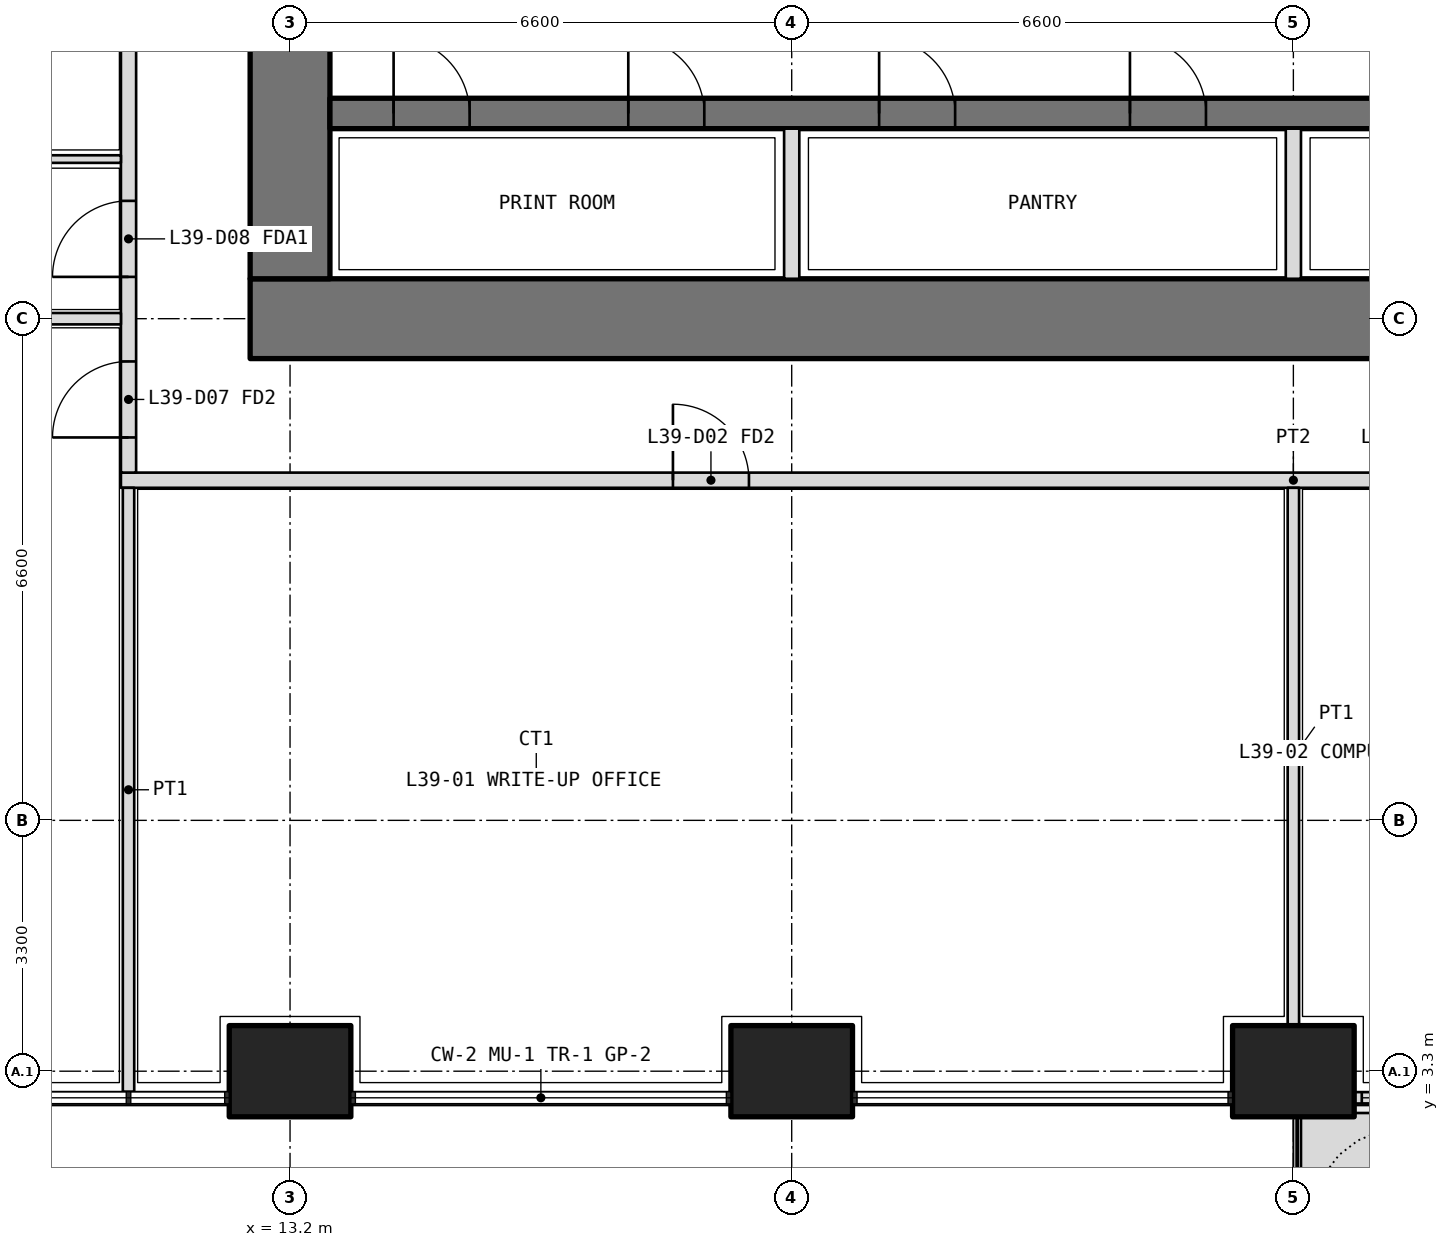
"""IFC4 building model, lengths in metres.
Left out: names, types, materials, properties, quantities, classifications, styles, units other than length and angle.
Written with IfcOpenShell. Run it as: python <this file> out.ifc"""

import sys

from ifc_helpers import new_model, si_unit, direction, frame, frame_2d, origin, origin_2d, place, context, subcontext, project, spatial, polyline, rectangle, outline, extrude, element, fill, save


model = new_model("IFC4")
c1 = context("Model", 3, precision=1e-05, world=origin(), true_north=direction((0.0, 1.0)))
c2 = subcontext(c1, "Body", "Model", "MODEL_VIEW")
j1 = project(units=[si_unit("LENGTHUNIT", "METRE"), si_unit("PLANEANGLEUNIT", "RADIAN")], contexts=[c1])
p1 = place(None, origin())
s1 = spatial("IfcSite", under=j1, at=p1, CompositionType="ELEMENT")
p2 = place(p1, origin())
s2 = spatial("IfcBuilding", under=s1, at=p2, CompositionType="ELEMENT")
p3 = place(p2, frame((0.0, 0.0, 172.5)))
s3 = spatial("IfcBuildingStorey", under=s2, at=p3, CompositionType="ELEMENT", Elevation=172.5)
for number, where, z_axis, x_axis in (
    (1, (13.2, 3.3, 0.0), (0.0, 0.0, 1.0), (1.0, 0.0, 0.0)),
    (2, (19.8, 3.3, 0.0), (0.0, 0.0, 1.0), (1.0, 0.0, 0.0)),
    (3, (26.4, 3.3, 0.0), (0.0, 0.0, 1.0), (1.0, 0.0, 0.0)),
):
    element("IfcColumn", number, at=place(p3, frame(where, z_axis=z_axis, x_axis=x_axis)), inside=s3, PredefinedType="COLUMN", context=c2, shape_type="SweptSolid", body=[
        extrude(rectangle(XDim=1.6, YDim=1.2, at=origin_2d()), origin(), (0.0, 0.0, 1.0), 4.2),
    ])
p4 = place(p3, origin())
e4 = element("IfcWall", 4, at=p4, inside=s3, PredefinedType="USERDEFINED", context=c2, shape_type="SweptSolid", body=[
    extrude(outline(polyline([(26.5, 1.75), (28.95, 1.75), (28.95, 2.75), (26.5, 2.75), (26.5, 1.75)]), holes=[polyline([(26.65, 1.9), (28.8, 1.9), (28.8, 2.6), (26.65, 2.6), (26.65, 1.9)])]), origin(), (0.0, 0.0, 1.0), 1.05),
])
p5 = place(p3, frame((27.2, 2.95, 0.0), z_axis=(0.0, 0.0, 1.0), x_axis=(1.0, 0.0, 0.0)))
e5 = element("IfcWall", 5, at=p5, inside=s3, PredefinedType="SOLIDWALL", context=c2, shape_type="SweptSolid", body=[
    extrude(rectangle(XDim=5.0, YDim=0.15, at=frame_2d((2.5, 0.0))), origin(), (0.0, 0.0, 1.0), 2.7),
])
p6 = place(p5, frame((2.75, 0.0, 0.0)))
e6 = element("IfcOpeningElement", 6, at=p6, cuts=e5, PredefinedType="OPENING", context=c2, shape_type="SweptSolid", body=[
    extrude(rectangle(XDim=1.0, YDim=2.4, at=frame_2d((0.5, 1.2))), frame((0.0, 0.085, 0.0), z_axis=(0.0, -1.0, 0.0), x_axis=(1.0, 0.0, 0.0)), (0.0, 0.0, 1.0), 0.17),
])
p7 = place(p5, frame((0.1, 0.0, 0.1)))
e7 = element("IfcOpeningElement", 7, at=p7, cuts=e5, PredefinedType="OPENING", context=c2, shape_type="SweptSolid", body=[
    extrude(rectangle(XDim=2.15, YDim=2.3, at=frame_2d((1.075, 1.15))), frame((0.0, 0.085, 0.0), z_axis=(0.0, -1.0, 0.0), x_axis=(1.0, 0.0, 0.0)), (0.0, 0.0, 1.0), 0.17),
])
p8 = place(p5, frame((3.85, 0.0, 0.1)))
e8 = element("IfcOpeningElement", 8, at=p8, cuts=e5, PredefinedType="OPENING", context=c2, shape_type="SweptSolid", body=[
    extrude(rectangle(XDim=1.05, YDim=2.3, at=frame_2d((0.525, 1.15))), frame((0.0, 0.085, 0.0), z_axis=(0.0, -1.0, 0.0), x_axis=(1.0, 0.0, 0.0)), (0.0, 0.0, 1.0), 0.17),
])
p9 = place(p3, frame((12.675, 13.2, 0.0), z_axis=(0.0, 0.0, 1.0), x_axis=(1.0, 0.0, 0.0)))
e9 = element("IfcWall", 9, at=p9, inside=s3, PredefinedType="SHEAR", context=c2, shape_type="SweptSolid", body=[
    extrude(rectangle(XDim=27.45, YDim=1.05, at=frame_2d((13.725, 0.0))), origin(), (0.0, 0.0, 1.0), 4.2),
])
p10 = place(p3, frame((13.2, 32.475, 0.0), z_axis=(0.0, 0.0, 1.0), x_axis=(0.0, -1.0, 0.0)))
e10 = element("IfcWall", 10, at=p10, inside=s3, PredefinedType="SHEAR", context=c2, shape_type="SweptSolid", body=[
    extrude(rectangle(XDim=18.75, YDim=1.05, at=frame_2d((9.375, 0.0))), origin(), (0.0, 0.0, 1.0), 4.2),
])
p11 = place(p10, frame((14.125, 0.0, 0.0)))
e11 = element("IfcOpeningElement", 11, at=p11, cuts=e10, PredefinedType="OPENING", context=c2, shape_type="SweptSolid", body=[
    extrude(rectangle(XDim=1.6, YDim=2.1, at=frame_2d((0.8, 1.05))), frame((0.0, 0.535, 0.0), z_axis=(0.0, -1.0, 0.0), x_axis=(1.0, 0.0, 0.0)), (0.0, 0.0, 1.0), 1.07),
])
p12 = place(p10, frame((3.325, 0.0, 0.0)))
e12 = element("IfcOpeningElement", 12, at=p12, cuts=e10, PredefinedType="OPENING", context=c2, shape_type="SweptSolid", body=[
    extrude(rectangle(XDim=1.6, YDim=2.1, at=frame_2d((0.8, 1.05))), frame((0.0, 0.535, 0.0), z_axis=(0.0, -1.0, 0.0), x_axis=(1.0, 0.0, 0.0)), (0.0, 0.0, 1.0), 1.07),
])
p13 = place(p3, frame((13.725, 15.9, 0.0), z_axis=(0.0, 0.0, 1.0), x_axis=(1.0, 0.0, 0.0)))
e13 = element("IfcWall", 13, at=p13, inside=s3, PredefinedType="SHEAR", context=c2, shape_type="SweptSolid", body=[
    extrude(rectangle(XDim=25.35, YDim=0.4, at=frame_2d((12.675, 0.0))), origin(), (0.0, 0.0, 1.0), 4.2),
])
p14 = place(p13, frame((0.837, 0.0, 0.0)))
e14 = element("IfcOpeningElement", 14, at=p14, cuts=e13, PredefinedType="OPENING", context=c2, shape_type="SweptSolid", body=[
    extrude(rectangle(XDim=1.0, YDim=2.1, at=frame_2d((0.5, 1.05))), frame((0.0, 0.21, 0.0), z_axis=(0.0, -1.0, 0.0), x_axis=(1.0, 0.0, 0.0)), (0.0, 0.0, 1.0), 0.42),
])
p15 = place(p13, frame((3.925, 0.0, 0.0)))
e15 = element("IfcOpeningElement", 15, at=p15, cuts=e13, PredefinedType="OPENING", context=c2, shape_type="SweptSolid", body=[
    extrude(rectangle(XDim=1.0, YDim=2.1, at=frame_2d((0.5, 1.05))), frame((0.0, 0.21, 0.0), z_axis=(0.0, -1.0, 0.0), x_axis=(1.0, 0.0, 0.0)), (0.0, 0.0, 1.0), 0.42),
])
p16 = place(p13, frame((7.225, 0.0, 0.0)))
e16 = element("IfcOpeningElement", 16, at=p16, cuts=e13, PredefinedType="OPENING", context=c2, shape_type="SweptSolid", body=[
    extrude(rectangle(XDim=1.0, YDim=2.1, at=frame_2d((0.5, 1.05))), frame((0.0, 0.21, 0.0), z_axis=(0.0, -1.0, 0.0), x_axis=(1.0, 0.0, 0.0)), (0.0, 0.0, 1.0), 0.42),
])
p17 = place(p13, frame((10.525, 0.0, 0.0)))
e17 = element("IfcOpeningElement", 17, at=p17, cuts=e13, PredefinedType="OPENING", context=c2, shape_type="SweptSolid", body=[
    extrude(rectangle(XDim=1.0, YDim=2.1, at=frame_2d((0.5, 1.05))), frame((0.0, 0.21, 0.0), z_axis=(0.0, -1.0, 0.0), x_axis=(1.0, 0.0, 0.0)), (0.0, 0.0, 1.0), 0.42),
])
p18 = place(p13, frame((13.825, 0.0, 0.0)))
e18 = element("IfcOpeningElement", 18, at=p18, cuts=e13, PredefinedType="OPENING", context=c2, shape_type="SweptSolid", body=[
    extrude(rectangle(XDim=1.0, YDim=2.1, at=frame_2d((0.5, 1.05))), frame((0.0, 0.21, 0.0), z_axis=(0.0, -1.0, 0.0), x_axis=(1.0, 0.0, 0.0)), (0.0, 0.0, 1.0), 0.42),
])
p19 = place(p13, frame((17.125, 0.0, 0.0)))
e19 = element("IfcOpeningElement", 19, at=p19, cuts=e13, PredefinedType="OPENING", context=c2, shape_type="SweptSolid", body=[
    extrude(rectangle(XDim=1.0, YDim=2.1, at=frame_2d((0.5, 1.05))), frame((0.0, 0.21, 0.0), z_axis=(0.0, -1.0, 0.0), x_axis=(1.0, 0.0, 0.0)), (0.0, 0.0, 1.0), 0.42),
])
p20 = place(p13, frame((20.425, 0.0, 0.0)))
e20 = element("IfcOpeningElement", 20, at=p20, cuts=e13, PredefinedType="OPENING", context=c2, shape_type="SweptSolid", body=[
    extrude(rectangle(XDim=1.0, YDim=2.1, at=frame_2d((0.5, 1.05))), frame((0.0, 0.21, 0.0), z_axis=(0.0, -1.0, 0.0), x_axis=(1.0, 0.0, 0.0)), (0.0, 0.0, 1.0), 0.42),
])
p21 = place(p13, frame((23.512, 0.0, 0.0)))
e21 = element("IfcOpeningElement", 21, at=p21, cuts=e13, PredefinedType="OPENING", context=c2, shape_type="SweptSolid", body=[
    extrude(rectangle(XDim=1.0, YDim=2.1, at=frame_2d((0.5, 1.05))), frame((0.0, 0.21, 0.0), z_axis=(0.0, -1.0, 0.0), x_axis=(1.0, 0.0, 0.0)), (0.0, 0.0, 1.0), 0.42),
])
for number, where, z_axis, x_axis in (
    (22, (19.8, 13.725, 0.0), (0.0, 0.0, 1.0), (0.0, 1.0, 0.0)),
    (23, (26.4, 13.725, 0.0), (0.0, 0.0, 1.0), (0.0, 1.0, 0.0)),
):
    element("IfcWall", number, at=place(p3, frame(where, z_axis=z_axis, x_axis=x_axis)), inside=s3, PredefinedType="PARTITIONING", context=c2, shape_type="SweptSolid", body=[
        extrude(rectangle(XDim=1.975, YDim=0.2, at=frame_2d((0.987, 0.0))), origin(), (0.0, 0.0, 1.0), 4.2),
    ])
p22 = place(p3, frame((10.975, 11.075, 0.0), z_axis=(0.0, 0.0, 1.0), x_axis=(1.0, 0.0, 0.0)))
e24 = element("IfcWall", 24, at=p22, inside=s3, PredefinedType="PARTITIONING", context=c2, shape_type="SweptSolid", body=[
    extrude(rectangle(XDim=30.85, YDim=0.2, at=frame_2d((15.425, 0.0))), origin(), (0.0, 0.0, 1.0), 2.85),
])
p23 = place(p22, frame((7.262, 0.0, 0.0)))
e25 = element("IfcOpeningElement", 25, at=p23, cuts=e24, PredefinedType="OPENING", context=c2, shape_type="SweptSolid", body=[
    extrude(rectangle(XDim=1.0, YDim=2.1, at=frame_2d((0.5, 1.05))), frame((0.0, 0.11, 0.0), z_axis=(0.0, -1.0, 0.0), x_axis=(1.0, 0.0, 0.0)), (0.0, 0.0, 1.0), 0.22),
])
p24 = place(p22, frame((16.475, 0.0, 0.0)))
e26 = element("IfcOpeningElement", 26, at=p24, cuts=e24, PredefinedType="OPENING", context=c2, shape_type="SweptSolid", body=[
    extrude(rectangle(XDim=1.2, YDim=2.1, at=frame_2d((0.6, 1.05))), frame((0.0, 0.11, 0.0), z_axis=(0.0, -1.0, 0.0), x_axis=(1.0, 0.0, 0.0)), (0.0, 0.0, 1.0), 0.22),
])
p25 = place(p22, frame((21.525, 0.0, 0.0)))
e27 = element("IfcOpeningElement", 27, at=p25, cuts=e24, PredefinedType="OPENING", context=c2, shape_type="SweptSolid", body=[
    extrude(rectangle(XDim=1.0, YDim=2.1, at=frame_2d((0.5, 1.05))), frame((0.0, 0.11, 0.0), z_axis=(0.0, -1.0, 0.0), x_axis=(1.0, 0.0, 0.0)), (0.0, 0.0, 1.0), 0.22),
])
p26 = place(p22, frame((26.375, 0.0, 0.0)))
e28 = element("IfcOpeningElement", 28, at=p26, cuts=e24, PredefinedType="OPENING", context=c2, shape_type="SweptSolid", body=[
    extrude(rectangle(XDim=1.2, YDim=2.1, at=frame_2d((0.6, 1.05))), frame((0.0, 0.11, 0.0), z_axis=(0.0, -1.0, 0.0), x_axis=(1.0, 0.0, 0.0)), (0.0, 0.0, 1.0), 0.22),
])
p27 = place(p22, frame((29.188, 0.0, 0.0)))
e29 = element("IfcOpeningElement", 29, at=p27, cuts=e24, PredefinedType="OPENING", context=c2, shape_type="SweptSolid", body=[
    extrude(rectangle(XDim=1.0, YDim=2.1, at=frame_2d((0.5, 1.05))), frame((0.0, 0.11, 0.0), z_axis=(0.0, -1.0, 0.0), x_axis=(1.0, 0.0, 0.0)), (0.0, 0.0, 1.0), 0.22),
])
p28 = place(p3, frame((11.075, 11.175, 0.0), z_axis=(0.0, 0.0, 1.0), x_axis=(0.0, 1.0, 0.0)))
e30 = element("IfcWall", 30, at=p28, inside=s3, PredefinedType="PARTITIONING", context=c2, shape_type="SweptSolid", body=[
    extrude(rectangle(XDim=15.225, YDim=0.2, at=frame_2d((7.612, 0.0))), origin(), (0.0, 0.0, 1.0), 2.85),
])
p29 = place(p28, frame((0.462, 0.0, 0.0)))
e31 = element("IfcOpeningElement", 31, at=p29, cuts=e30, PredefinedType="OPENING", context=c2, shape_type="SweptSolid", body=[
    extrude(rectangle(XDim=1.0, YDim=2.1, at=frame_2d((0.5, 1.05))), frame((0.0, 0.11, 0.0), z_axis=(0.0, -1.0, 0.0), x_axis=(1.0, 0.0, 0.0)), (0.0, 0.0, 1.0), 0.22),
])
p30 = place(p28, frame((2.575, 0.0, 0.0)))
e32 = element("IfcOpeningElement", 32, at=p30, cuts=e30, PredefinedType="OPENING", context=c2, shape_type="SweptSolid", body=[
    extrude(rectangle(XDim=1.0, YDim=2.1, at=frame_2d((0.5, 1.05))), frame((0.0, 0.11, 0.0), z_axis=(0.0, -1.0, 0.0), x_axis=(1.0, 0.0, 0.0)), (0.0, 0.0, 1.0), 0.22),
])
p31 = place(p28, frame((5.625, 0.0, 0.0)))
e33 = element("IfcOpeningElement", 33, at=p31, cuts=e30, PredefinedType="OPENING", context=c2, shape_type="SweptSolid", body=[
    extrude(rectangle(XDim=0.9, YDim=2.1, at=frame_2d((0.45, 1.05))), frame((0.0, 0.11, 0.0), z_axis=(0.0, -1.0, 0.0), x_axis=(1.0, 0.0, 0.0)), (0.0, 0.0, 1.0), 0.22),
])
p32 = place(p28, frame((9.425, 0.0, 0.0)))
e34 = element("IfcOpeningElement", 34, at=p32, cuts=e30, PredefinedType="OPENING", context=c2, shape_type="SweptSolid", body=[
    extrude(rectangle(XDim=0.9, YDim=2.1, at=frame_2d((0.45, 1.05))), frame((0.0, 0.11, 0.0), z_axis=(0.0, -1.0, 0.0), x_axis=(1.0, 0.0, 0.0)), (0.0, 0.0, 1.0), 0.22),
])
p33 = place(p28, frame((12.975, 0.0, 0.0)))
e35 = element("IfcOpeningElement", 35, at=p33, cuts=e30, PredefinedType="OPENING", context=c2, shape_type="SweptSolid", body=[
    extrude(rectangle(XDim=1.0, YDim=2.1, at=frame_2d((0.5, 1.05))), frame((0.0, 0.11, 0.0), z_axis=(0.0, -1.0, 0.0), x_axis=(1.0, 0.0, 0.0)), (0.0, 0.0, 1.0), 0.22),
])
p34 = place(p3, frame((11.075, 3.03, 0.0), z_axis=(0.0, 0.0, 1.0), x_axis=(0.0, 1.0, 0.0)))
e36 = element("IfcWall", 36, at=p34, inside=s3, PredefinedType="PARTITIONING", context=c2, shape_type="SweptSolid", body=[
    extrude(rectangle(XDim=7.945, YDim=0.15, at=frame_2d((3.973, 0.0))), origin(), (0.0, 0.0, 1.0), 2.7),
])
p35 = place(p3, frame((26.4, 3.9, 0.0), z_axis=(0.0, 0.0, 1.0), x_axis=(0.0, 1.0, 0.0)))
e37 = element("IfcWall", 37, at=p35, inside=s3, PredefinedType="PARTITIONING", context=c2, shape_type="SweptSolid", body=[
    extrude(rectangle(XDim=7.075, YDim=0.15, at=frame_2d((3.538, 0.0))), origin(), (0.0, 0.0, 1.0), 2.85),
])
p36 = place(p3, frame((3.03, 15.3, 0.0), z_axis=(0.0, 0.0, 1.0), x_axis=(1.0, 0.0, 0.0)))
e38 = element("IfcWall", 38, at=p36, inside=s3, PredefinedType="PARTITIONING", context=c2, shape_type="SweptSolid", body=[
    extrude(rectangle(XDim=7.945, YDim=0.1, at=frame_2d((3.973, 0.0))), origin(), (0.0, 0.0, 1.0), 2.7),
])
p37 = place(p3, frame((7.2, 13.2, 0.0), z_axis=(0.0, 0.0, 1.0), x_axis=(1.0, 0.0, 0.0)))
e39 = element("IfcWall", 39, at=p37, inside=s3, PredefinedType="PARTITIONING", context=c2, shape_type="SweptSolid", body=[
    extrude(rectangle(XDim=3.775, YDim=0.15, at=frame_2d((1.888, 0.0))), origin(), (0.0, 0.0, 1.0), 2.85),
])
p38 = place(p7, origin())
e40 = element("IfcWindow", 40, at=p38, inside=s3, PartitioningType="SINGLE_PANEL", PredefinedType="WINDOW", context=c2, shape_type="SweptSolid", body=[
    extrude(rectangle(XDim=2.15, YDim=2.3, at=frame_2d((1.075, 1.15))), frame((0.0, 0.03, 0.0), z_axis=(0.0, -1.0, 0.0), x_axis=(1.0, 0.0, 0.0)), (0.0, 0.0, 1.0), 0.06),
])
fill(e7, e40)
p39 = place(p23, origin())
e41 = element("IfcDoor", 41, at=p39, inside=s3, OperationType="SINGLE_SWING_LEFT", PredefinedType="DOOR", context=c2, shape_type="SweptSolid", body=[
    extrude(rectangle(XDim=1.0, YDim=2.1, at=frame_2d((0.5, 1.05))), frame((0.0, 0.025, 0.0), z_axis=(0.0, -1.0, 0.0), x_axis=(1.0, 0.0, 0.0)), (0.0, 0.0, 1.0), 0.05),
])
fill(e25, e41)
p40 = place(p29, origin())
e42 = element("IfcDoor", 42, at=p40, inside=s3, OperationType="SINGLE_SWING_LEFT", PredefinedType="DOOR", context=c2, shape_type="SweptSolid", body=[
    extrude(rectangle(XDim=1.0, YDim=2.1, at=frame_2d((0.5, 1.05))), frame((0.0, 0.025, 0.0), z_axis=(0.0, -1.0, 0.0), x_axis=(1.0, 0.0, 0.0)), (0.0, 0.0, 1.0), 0.05),
])
fill(e31, e42)
p41 = place(p30, origin())
e43 = element("IfcDoor", 43, at=p41, inside=s3, OperationType="SINGLE_SWING_LEFT", PredefinedType="DOOR", context=c2, shape_type="SweptSolid", body=[
    extrude(rectangle(XDim=1.0, YDim=2.1, at=frame_2d((0.5, 1.05))), frame((0.0, 0.025, 0.0), z_axis=(0.0, -1.0, 0.0), x_axis=(1.0, 0.0, 0.0)), (0.0, 0.0, 1.0), 0.05),
])
fill(e32, e43)
p42 = place(p14, origin())
e44 = element("IfcDoor", 44, at=p42, inside=s3, OperationType="SINGLE_SWING_LEFT", PredefinedType="DOOR", context=c2, shape_type="SweptSolid", body=[
    extrude(rectangle(XDim=1.0, YDim=2.1, at=frame_2d((0.5, 1.05))), frame((0.0, 0.025, 0.0), z_axis=(0.0, -1.0, 0.0), x_axis=(1.0, 0.0, 0.0)), (0.0, 0.0, 1.0), 0.05),
])
fill(e14, e44)
p43 = place(p15, origin())
e45 = element("IfcDoor", 45, at=p43, inside=s3, OperationType="SINGLE_SWING_LEFT", PredefinedType="DOOR", context=c2, shape_type="SweptSolid", body=[
    extrude(rectangle(XDim=1.0, YDim=2.1, at=frame_2d((0.5, 1.05))), frame((0.0, 0.025, 0.0), z_axis=(0.0, -1.0, 0.0), x_axis=(1.0, 0.0, 0.0)), (0.0, 0.0, 1.0), 0.05),
])
fill(e15, e45)
p44 = place(p16, origin())
e46 = element("IfcDoor", 46, at=p44, inside=s3, OperationType="SINGLE_SWING_LEFT", PredefinedType="DOOR", context=c2, shape_type="SweptSolid", body=[
    extrude(rectangle(XDim=1.0, YDim=2.1, at=frame_2d((0.5, 1.05))), frame((0.0, 0.025, 0.0), z_axis=(0.0, -1.0, 0.0), x_axis=(1.0, 0.0, 0.0)), (0.0, 0.0, 1.0), 0.05),
])
fill(e16, e46)
p45 = place(p17, origin())
e47 = element("IfcDoor", 47, at=p45, inside=s3, OperationType="SINGLE_SWING_LEFT", PredefinedType="DOOR", context=c2, shape_type="SweptSolid", body=[
    extrude(rectangle(XDim=1.0, YDim=2.1, at=frame_2d((0.5, 1.05))), frame((0.0, 0.025, 0.0), z_axis=(0.0, -1.0, 0.0), x_axis=(1.0, 0.0, 0.0)), (0.0, 0.0, 1.0), 0.05),
])
fill(e17, e47)
save(model, sys.argv[1])
